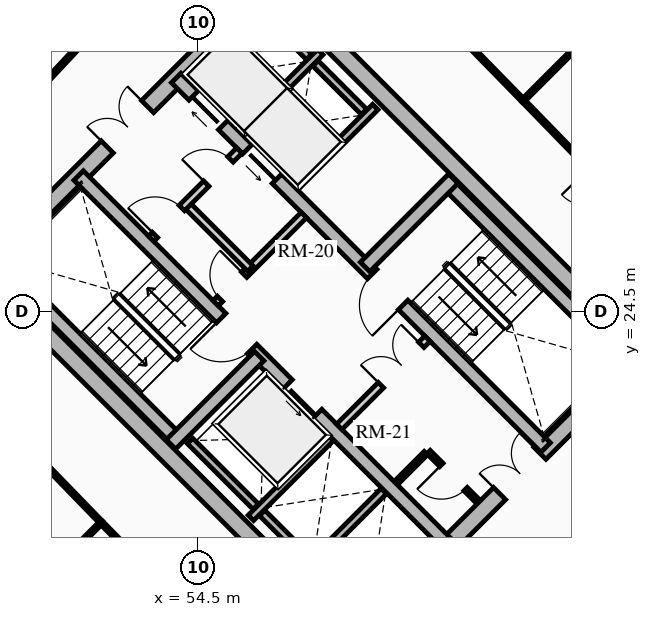
"""IFC4 building model, lengths in metres.
Left out: names, types, materials, properties, quantities, classifications, styles, units other than length and angle.
Written with IfcOpenShell. Run it as: python <this file> out.ifc"""

import sys

from ifc_helpers import new_model, si_unit, direction, frame, frame_2d, origin, place, context, subcontext, project, spatial, rectangle, extrude, source, transform, mapped, element, fill, save


model = new_model("IFC4")
c1 = context("Model", 3, precision=1e-05, world=origin(), true_north=direction((0.0, 1.0)))
c2 = subcontext(c1, "Body", "Model", "MODEL_VIEW")
j1 = project(units=[si_unit("LENGTHUNIT", "METRE"), si_unit("PLANEANGLEUNIT", "RADIAN")], contexts=[c1])
p1 = place(None, origin())
s1 = spatial("IfcSite", under=j1, at=p1, CompositionType="ELEMENT")
p2 = place(p1, origin())
s2 = spatial("IfcBuilding", under=s1, at=p2, CompositionType="ELEMENT")
p3 = place(p2, frame((0.0, 0.0, 99.25)))
s3 = spatial("IfcBuildingStorey", under=s2, at=p3, CompositionType="ELEMENT", Elevation=99.25)
for number, where, z_axis, x_axis in (
    (1, (58.737, 15.697, 0.0), (0.0, 0.0, 1.0), (-0.707, 0.707, 0.0)),
    (2, (66.303, 23.263, 0.0), (0.0, 0.0, 1.0), (-0.707, 0.707, 0.0)),
):
    element("IfcWall", number, at=place(p3, frame(where, z_axis=z_axis, x_axis=x_axis)), inside=s3, PredefinedType="SHEAR", context=c2, shape_type="SweptSolid", body=[
        extrude(rectangle(XDim=14.2, YDim=0.45, at=frame_2d((7.1, 0.0))), origin(), (0.0, 0.0, 1.0), 2.91),
    ])
p4 = place(p3, frame((58.578, 15.856, 0.0), z_axis=(0.0, 0.0, 1.0), x_axis=(0.707106781187, 0.707106781187, 0.0)))
e3 = element("IfcWall", 3, at=p4, inside=s3, PredefinedType="SHEAR", context=c2, shape_type="SweptSolid", body=[
    extrude(rectangle(XDim=10.7, YDim=0.45, at=frame_2d((5.35, 0.0))), origin(), (0.0, 0.0, 1.0), 2.91),
])
m1 = source(origin(), c2, "Body", "SweptSolid", [
    extrude(rectangle(XDim=1.5, YDim=2.02, at=frame_2d((0.75, 1.01))), frame((0.0, 0.235, 0.0), z_axis=(0.0, -1.0, 0.0), x_axis=(1.0, 0.0, 0.0)), (0.0, 0.0, 1.0), 0.47),
])
p5 = place(p4, frame((5.45, 0.0, 0.0)))
e4 = element("IfcOpeningElement", 4, at=p5, cuts=e3, PredefinedType="OPENING", context=c2, shape_type="MappedRepresentation", body=[
    mapped(m1, transform((0.0, 0.0, 0.0), x_axis=(1.0, 0.0, 0.0), y_axis=(0.0, 1.0, 0.0), z_axis=(0.0, 0.0, 1.0), scale=1.0)),
])
p6 = place(p3, frame((48.856, 25.578, 0.0), z_axis=(0.0, 0.0, 1.0), x_axis=(0.707106781187, 0.707106781187, 0.0)))
e5 = element("IfcWall", 5, at=p6, inside=s3, PredefinedType="SHEAR", context=c2, shape_type="SweptSolid", body=[
    extrude(rectangle(XDim=10.7, YDim=0.45, at=frame_2d((5.35, 0.0))), origin(), (0.0, 0.0, 1.0), 2.91),
])
p7 = place(p6, frame((4.6, 0.0, 0.0)))
e6 = element("IfcOpeningElement", 6, at=p7, cuts=e5, PredefinedType="OPENING", context=c2, shape_type="MappedRepresentation", body=[
    mapped(m1, transform((0.0, 0.0, 0.0), x_axis=(1.0, 0.0, 0.0), y_axis=(0.0, 1.0, 0.0), z_axis=(0.0, 0.0, 1.0), scale=1.0)),
])
p8 = place(p3, frame((61.078, 18.355, 0.0), z_axis=(0.0, 0.0, 1.0), x_axis=(-0.707106781187, 0.707106781187, 0.0)))
e7 = element("IfcWall", 7, at=p8, inside=s3, PredefinedType="SHEAR", context=c2, shape_type="SweptSolid", body=[
    extrude(rectangle(XDim=13.75, YDim=0.35, at=frame_2d((6.875, 0.0))), origin(), (0.0, 0.0, 1.0), 2.91),
])
m2 = source(origin(), c2, "Body", "SweptSolid", [
    extrude(rectangle(XDim=1.1, YDim=2.015, at=frame_2d((0.55, 1.007))), frame((0.0, 0.185, 0.0), z_axis=(0.0, -1.0, 0.0), x_axis=(1.0, 0.0, 0.0)), (0.0, 0.0, 1.0), 0.37),
])
p9 = place(p8, frame((4.875, 0.0, 0.0)))
e8 = element("IfcOpeningElement", 8, at=p9, cuts=e7, PredefinedType="OPENING", context=c2, shape_type="MappedRepresentation", body=[
    mapped(m2, transform((0.0, 0.0, 0.0), x_axis=(1.0, 0.0, 0.0), y_axis=(0.0, 1.0, 0.0), z_axis=(0.0, 0.0, 1.0), scale=1.0)),
])
m3 = source(origin(), c2, "Body", "SweptSolid", [
    extrude(rectangle(XDim=1.15, YDim=2.02, at=frame_2d((0.575, 1.01))), frame((0.0, 0.185, 0.0), z_axis=(0.0, -1.0, 0.0), x_axis=(1.0, 0.0, 0.0)), (0.0, 0.0, 1.0), 0.37),
])
p10 = place(p8, frame((7.295, 0.0, 0.0)))
e9 = element("IfcOpeningElement", 9, at=p10, cuts=e7, PredefinedType="OPENING", context=c2, shape_type="MappedRepresentation", body=[
    mapped(m3, transform((0.0, 0.0, 0.0), x_axis=(1.0, 0.0, 0.0), y_axis=(0.0, 1.0, 0.0), z_axis=(0.0, 0.0, 1.0), scale=1.0)),
])
p11 = place(p3, frame((63.645, 20.922, 0.0), z_axis=(0.0, 0.0, 1.0), x_axis=(-0.707106781187, 0.707106781187, 0.0)))
e10 = element("IfcWall", 10, at=p11, inside=s3, PredefinedType="SHEAR", context=c2, shape_type="SweptSolid", body=[
    extrude(rectangle(XDim=13.75, YDim=0.35, at=frame_2d((6.875, 0.0))), origin(), (0.0, 0.0, 1.0), 2.91),
])
p12 = place(p11, frame((10.0, 0.0, 0.0)))
e11 = element("IfcOpeningElement", 11, at=p12, cuts=e10, PredefinedType="OPENING", context=c2, shape_type="MappedRepresentation", body=[
    mapped(m2, transform((0.0, 0.0, 0.0), x_axis=(1.0, 0.0, 0.0), y_axis=(0.0, 1.0, 0.0), z_axis=(0.0, 0.0, 1.0), scale=1.0)),
])
p13 = place(p11, frame((12.0, 0.0, 0.0)))
e12 = element("IfcOpeningElement", 12, at=p13, cuts=e10, PredefinedType="OPENING", context=c2, shape_type="MappedRepresentation", body=[
    mapped(m2, transform((0.0, 0.0, 0.0), x_axis=(1.0, 0.0, 0.0), y_axis=(0.0, 1.0, 0.0), z_axis=(0.0, 0.0, 1.0), scale=1.0)),
])
p14 = place(p11, frame((5.305, 0.0, 0.0)))
e13 = element("IfcOpeningElement", 13, at=p14, cuts=e10, PredefinedType="OPENING", context=c2, shape_type="MappedRepresentation", body=[
    mapped(m3, transform((0.0, 0.0, 0.0), x_axis=(1.0, 0.0, 0.0), y_axis=(0.0, 1.0, 0.0), z_axis=(0.0, 0.0, 1.0), scale=1.0)),
])
p15 = place(p3, frame((53.922, 21.141, 0.0), z_axis=(0.0, 0.0, 1.0), x_axis=(-0.707088616009, 0.707124945897, 0.0)))
e14 = element("IfcWall", 14, at=p15, inside=s3, PredefinedType="SHEAR", context=c2, shape_type="SweptSolid", body=[
    extrude(rectangle(XDim=6.72, YDim=0.35, at=frame_2d((3.36, 0.0))), origin(), (0.0, 0.0, 1.0), 2.91),
])
p16 = place(p3, frame((53.784, 21.003, 0.0), z_axis=(0.0, 0.0, 1.0), x_axis=(0.707106781187, 0.707106781187, 0.0)))
e15 = element("IfcWall", 15, at=p16, inside=s3, PredefinedType="SHEAR", context=c2, shape_type="SweptSolid", body=[
    extrude(rectangle(XDim=3.285, YDim=0.35, at=frame_2d((1.643, 0.0))), origin(), (0.0, 0.0, 1.0), 2.91),
])
p17 = place(p3, frame((65.83, 23.107, 0.0), z_axis=(0.0, 0.0, 1.0), x_axis=(-0.707088616009, 0.707124945897, 0.0)))
e16 = element("IfcWall", 16, at=p17, inside=s3, PredefinedType="SHEAR", context=c2, shape_type="SweptSolid", body=[
    extrude(rectangle(XDim=6.72, YDim=0.35, at=frame_2d((3.36, 0.0))), origin(), (0.0, 0.0, 1.0), 2.91),
])
p18 = place(p3, frame((58.893, 25.674, 0.0), z_axis=(0.0, 0.0, 1.0), x_axis=(0.707106781187, 0.707106781187, 0.0)))
e17 = element("IfcWall", 17, at=p18, inside=s3, PredefinedType="SHEAR", context=c2, shape_type="SweptSolid", body=[
    extrude(rectangle(XDim=3.285, YDim=0.35, at=frame_2d((1.643, 0.0))), origin(), (0.0, 0.0, 1.0), 2.91),
])
p19 = place(p3, frame((55.888, 19.069, 0.0), z_axis=(0.0, 0.0, 1.0), x_axis=(0.707106781187, 0.707106781187, 0.0)))
e18 = element("IfcWall", 18, at=p19, inside=s3, PredefinedType="SHEAR", context=c2, shape_type="SweptSolid", body=[
    extrude(rectangle(XDim=2.97, YDim=0.2, at=frame_2d((1.485, 0.0))), origin(), (0.0, 0.0, 1.0), 2.91),
])
p20 = place(p3, frame((56.015, 19.366, 0.0), z_axis=(0.0, 0.0, 1.0), x_axis=(-0.707106781187, 0.707106781187, 0.0)))
e19 = element("IfcWall", 19, at=p20, inside=s3, PredefinedType="SHEAR", context=c2, shape_type="SweptSolid", body=[
    extrude(rectangle(XDim=2.44, YDim=0.2, at=frame_2d((1.22, 0.0))), origin(), (0.0, 0.0, 1.0), 2.91),
])
p21 = place(p3, frame((57.284, 17.673, 0.0), z_axis=(0.0, 0.0, 1.0), x_axis=(0.707147878904, 0.70706568108, 0.0)))
e20 = element("IfcWall", 20, at=p21, inside=s3, PredefinedType="SHEAR", context=c2, shape_type="SweptSolid", body=[
    extrude(rectangle(XDim=2.97, YDim=0.2, at=frame_2d((1.485, 0.0))), origin(), (0.0, 0.0, 1.0), 2.91),
])
p22 = place(p3, frame((57.412, 17.97, 0.0), z_axis=(0.0, 0.0, 1.0), x_axis=(-0.707106781187, 0.707106781187, 0.0)))
e21 = element("IfcWall", 21, at=p22, inside=s3, PredefinedType="SHEAR", context=c2, shape_type="SweptSolid", body=[
    extrude(rectangle(XDim=1.735, YDim=0.2, at=frame_2d((0.867, 0.0))), origin(), (0.0, 0.0, 1.0), 2.91),
])
p23 = place(p3, frame((57.062, 27.781, 0.0), z_axis=(0.0, 0.0, 1.0), x_axis=(0.707106781187, 0.707106781187, 0.0)))
e22 = element("IfcWall", 22, at=p23, inside=s3, PredefinedType="SHEAR", context=c2, shape_type="SweptSolid", body=[
    extrude(rectangle(XDim=2.97, YDim=0.2, at=frame_2d((1.485, 0.0))), origin(), (0.0, 0.0, 1.0), 2.91),
])
p24 = place(p3, frame((55.615, 29.227, 0.0), z_axis=(0.0, 0.0, 1.0), x_axis=(0.707147878904, 0.70706568108, 0.0)))
e23 = element("IfcWall", 23, at=p24, inside=s3, PredefinedType="SHEAR", context=c2, shape_type="SweptSolid", body=[
    extrude(rectangle(XDim=2.97, YDim=0.2, at=frame_2d((1.485, 0.0))), origin(), (0.0, 0.0, 1.0), 2.91),
])
p25 = place(p3, frame((58.865, 29.754, 0.0), z_axis=(0.0, 0.0, 1.0), x_axis=(-0.707174411312, 0.707039144592, 0.0)))
e24 = element("IfcWall", 24, at=p25, inside=s3, PredefinedType="SHEAR", context=c2, shape_type="SweptSolid", body=[
    extrude(rectangle(XDim=1.805, YDim=0.2, at=frame_2d((0.902, 0.0))), origin(), (0.0, 0.0, 1.0), 2.91),
])
p26 = place(p3, frame((57.419, 31.2, 0.0), z_axis=(0.0, 0.0, 1.0), x_axis=(-0.707032117043, 0.707181437447, 0.0)))
e25 = element("IfcWall", 25, at=p26, inside=s3, PredefinedType="SHEAR", context=c2, shape_type="SweptSolid", body=[
    extrude(rectangle(XDim=1.635, YDim=0.2, at=frame_2d((0.817, 0.0))), origin(), (0.0, 0.0, 1.0), 2.91),
])
p27 = place(p3, frame((58.214, 21.467, 0.0), z_axis=(0.0, 0.0, 1.0), x_axis=(0.707106781187, 0.707106781187, 0.0)))
e26 = element("IfcWall", 26, at=p27, inside=s3, PredefinedType="PARTITIONING", context=c2, shape_type="SweptSolid", body=[
    extrude(rectangle(XDim=3.28, YDim=0.2, at=frame_2d((1.64, 0.0))), origin(), (0.0, 0.0, 1.0), 2.655),
])
m4 = source(origin(), c2, "Body", "SweptSolid", [
    extrude(rectangle(XDim=1.5, YDim=2.02, at=frame_2d((0.75, 1.01))), frame((0.0, 0.11, 0.0), z_axis=(0.0, -1.0, 0.0), x_axis=(1.0, 0.0, 0.0)), (0.0, 0.0, 1.0), 0.22),
])
p28 = place(p27, frame((1.55, 0.0, 0.0)))
e27 = element("IfcOpeningElement", 27, at=p28, cuts=e26, PredefinedType="OPENING", context=c2, shape_type="MappedRepresentation", body=[
    mapped(m4, transform((0.0, 0.0, 0.0), x_axis=(1.0, 0.0, 0.0), y_axis=(0.0, 1.0, 0.0), z_axis=(0.0, 0.0, 1.0), scale=1.0)),
])
p29 = place(p3, frame((54.961, 24.719, 0.0), z_axis=(0.0, 0.0, 1.0), x_axis=(0.707106781187, 0.707106781187, 0.0)))
e28 = element("IfcWall", 28, at=p29, inside=s3, PredefinedType="PARTITIONING", context=c2, shape_type="SweptSolid", body=[
    extrude(rectangle(XDim=3.28, YDim=0.2, at=frame_2d((1.64, 0.0))), origin(), (0.0, 0.0, 1.0), 2.655),
])
m5 = source(origin(), c2, "Body", "SweptSolid", [
    extrude(rectangle(XDim=0.9, YDim=2.005, at=frame_2d((0.45, 1.002))), frame((0.0, 0.11, 0.0), z_axis=(0.0, -1.0, 0.0), x_axis=(1.0, 0.0, 0.0)), (0.0, 0.0, 1.0), 0.22),
])
p30 = place(p29, frame((0.16, 0.0, 0.0)))
e29 = element("IfcOpeningElement", 29, at=p30, cuts=e28, PredefinedType="OPENING", context=c2, shape_type="MappedRepresentation", body=[
    mapped(m5, transform((0.0, 0.0, 0.0), x_axis=(1.0, 0.0, 0.0), y_axis=(0.0, 1.0, 0.0), z_axis=(0.0, 0.0, 1.0), scale=1.0)),
])
p31 = place(p3, frame((55.874, 25.631, 0.0), z_axis=(0.0, 0.0, 1.0), x_axis=(-0.707157639372, 0.707055919343, 0.0)))
e30 = element("IfcWall", 30, at=p31, inside=s3, PredefinedType="PARTITIONING", context=c2, shape_type="SweptSolid", body=[
    extrude(rectangle(XDim=2.4, YDim=0.2, at=frame_2d((1.2, 0.0))), origin(), (0.0, 0.0, 1.0), 2.655),
])
p32 = place(p3, frame((53.264, 26.416, 0.0), z_axis=(0.0, 0.0, 1.0), x_axis=(0.707106781187, 0.707106781187, 0.0)))
e31 = element("IfcWall", 31, at=p32, inside=s3, PredefinedType="PARTITIONING", context=c2, shape_type="SweptSolid", body=[
    extrude(rectangle(XDim=3.28, YDim=0.2, at=frame_2d((1.64, 0.0))), origin(), (0.0, 0.0, 1.0), 2.655),
])
m6 = source(origin(), c2, "Body", "SweptSolid", [
    extrude(rectangle(XDim=1.0, YDim=2.015, at=frame_2d((0.5, 1.007))), frame((0.0, 0.11, 0.0), z_axis=(0.0, -1.0, 0.0), x_axis=(1.0, 0.0, 0.0)), (0.0, 0.0, 1.0), 0.22),
])
p33 = place(p32, frame((0.14, 0.0, 0.0)))
e32 = element("IfcOpeningElement", 32, at=p33, cuts=e31, PredefinedType="OPENING", context=c2, shape_type="MappedRepresentation", body=[
    mapped(m6, transform((0.0, 0.0, 0.0), x_axis=(1.0, 0.0, 0.0), y_axis=(0.0, 1.0, 0.0), z_axis=(0.0, 0.0, 1.0), scale=1.0)),
])
p34 = place(p32, frame((2.05, 0.0, 0.0)))
e33 = element("IfcOpeningElement", 33, at=p34, cuts=e31, PredefinedType="OPENING", context=c2, shape_type="MappedRepresentation", body=[
    mapped(m5, transform((0.0, 0.0, 0.0), x_axis=(1.0, 0.0, 0.0), y_axis=(0.0, 1.0, 0.0), z_axis=(0.0, 0.0, 1.0), scale=1.0)),
])
p35 = place(p3, frame((61.835, 19.529, 0.0), z_axis=(0.0, 0.0, 1.0), x_axis=(-0.707174592913, 0.707038962956, 0.0)))
e34 = element("IfcWall", 34, at=p35, inside=s3, PredefinedType="PARTITIONING", context=c2, shape_type="SweptSolid", body=[
    extrude(rectangle(XDim=1.8, YDim=0.125, at=frame_2d((0.9, 0.0))), origin(), (0.0, 0.0, 1.0), 2.655),
])
m7 = source(origin(), c2, "Body", "SweptSolid", [
    extrude(rectangle(XDim=0.9, YDim=2.005, at=frame_2d((0.45, 1.002))), frame((0.0, 0.073, 0.0), z_axis=(0.0, -1.0, 0.0), x_axis=(1.0, 0.0, 0.0)), (0.0, 0.0, 1.0), 0.145),
])
p36 = place(p35, frame((0.42, 0.0, 0.0)))
e35 = element("IfcOpeningElement", 35, at=p36, cuts=e34, PredefinedType="OPENING", context=c2, shape_type="MappedRepresentation", body=[
    mapped(m7, transform((0.0, 0.0, 0.0), x_axis=(1.0, 0.0, 0.0), y_axis=(0.0, 1.0, 0.0), z_axis=(0.0, 0.0, 1.0), scale=1.0)),
])
p37 = place(p3, frame((59.713, 19.996, 0.0), z_axis=(0.0, 0.0, 1.0), x_axis=(0.707217726, 0.706995818963, 0.0)))
e36 = element("IfcWall", 36, at=p37, inside=s3, PredefinedType="PARTITIONING", context=c2, shape_type="SweptSolid", body=[
    extrude(rectangle(XDim=1.1, YDim=0.125, at=frame_2d((0.55, 0.0))), origin(), (0.0, 0.0, 1.0), 2.655),
])
p38 = place(p3, frame((63.051, 30.051, 0.0), z_axis=(0.0, 0.0, 1.0), x_axis=(-0.698911483116, 0.715208178622, 0.0)))
e37 = element("IfcWall", 37, at=p38, inside=s3, PredefinedType="MOVABLE", context=c2, shape_type="SweptSolid", body=[
    extrude(rectangle(XDim=6.082, YDim=0.1, at=frame_2d((3.041, 0.0))), origin(), (0.0, 0.0, 1.0), 2.225),
])
p39 = place(p3, frame((52.072, 32.237, 0.0), z_axis=(0.0, 0.0, 1.0), x_axis=(-0.682528774423, -0.730858722383, 0.0)))
e38 = element("IfcWall", 38, at=p39, inside=s3, PredefinedType="MOVABLE", context=c2, shape_type="SweptSolid", body=[
    extrude(rectangle(XDim=6.486, YDim=0.1, at=frame_2d((3.243, 0.0))), origin(), (0.0, 0.0, 1.0), 2.225),
])
p40 = place(p3, frame((47.763, 23.265, 0.0), z_axis=(0.0, 0.0, 1.0), x_axis=(0.696243493404, -0.717805682544, 0.0)))
e39 = element("IfcWall", 39, at=p40, inside=s3, PredefinedType="MOVABLE", context=c2, shape_type="SweptSolid", body=[
    extrude(rectangle(XDim=6.012, YDim=0.1, at=frame_2d((3.006, 0.0))), origin(), (0.0, 0.0, 1.0), 2.655),
])
m8 = source(origin(), c2, "Body", "SweptSolid", [
    extrude(rectangle(XDim=1.05, YDim=2.015, at=frame_2d((0.525, 1.007))), frame((0.0, 0.06, 0.0), z_axis=(0.0, -1.0, 0.0), x_axis=(1.0, 0.0, 0.0)), (0.0, 0.0, 1.0), 0.12),
])
p41 = place(p40, frame((2.481, 0.0, 0.0)))
e40 = element("IfcOpeningElement", 40, at=p41, cuts=e39, PredefinedType="OPENING", context=c2, shape_type="MappedRepresentation", body=[
    mapped(m8, transform((0.0, 0.0, 0.0), x_axis=(1.0, 0.0, 0.0), y_axis=(0.0, 1.0, 0.0), z_axis=(0.0, 0.0, 1.0), scale=1.0)),
])
p42 = place(p3, frame((51.949, 18.949, 0.0), z_axis=(0.0, 0.0, 1.0), x_axis=(0.699840807936, -0.714298847506, 0.0)))
e41 = element("IfcWall", 41, at=p42, inside=s3, PredefinedType="MOVABLE", context=c2, shape_type="SweptSolid", body=[
    extrude(rectangle(XDim=6.13, YDim=0.1, at=frame_2d((3.065, 0.0))), origin(), (0.0, 0.0, 1.0), 2.225),
])
p43 = place(p3, frame((62.875, 16.709, 0.0), z_axis=(0.0, 0.0, 1.0), x_axis=(0.682290572861, 0.731081099595, 0.0)))
e42 = element("IfcWall", 42, at=p43, inside=s3, PredefinedType="MOVABLE", context=c2, shape_type="SweptSolid", body=[
    extrude(rectangle(XDim=6.6, YDim=0.1, at=frame_2d((3.3, 0.0))), origin(), (0.0, 0.0, 1.0), 2.225),
])
p44 = place(p3, frame((67.213, 25.768, 0.0), z_axis=(0.0, 0.0, 1.0), x_axis=(-0.696916079748, 0.717152687918, 0.0)))
e43 = element("IfcWall", 43, at=p44, inside=s3, PredefinedType="MOVABLE", context=c2, shape_type="SweptSolid", body=[
    extrude(rectangle(XDim=5.972, YDim=0.1, at=frame_2d((2.986, 0.0))), origin(), (0.0, 0.0, 1.0), 2.655),
])
m9 = source(origin(), c2, "Body", "SweptSolid", [
    extrude(rectangle(XDim=1.0, YDim=2.015, at=frame_2d((0.5, 1.007))), frame((0.0, 0.06, 0.0), z_axis=(0.0, -1.0, 0.0), x_axis=(1.0, 0.0, 0.0)), (0.0, 0.0, 1.0), 0.12),
])
p45 = place(p44, frame((2.486, 0.0, 0.0)))
e44 = element("IfcOpeningElement", 44, at=p45, cuts=e43, PredefinedType="OPENING", context=c2, shape_type="MappedRepresentation", body=[
    mapped(m9, transform((0.0, 0.0, 0.0), x_axis=(1.0, 0.0, 0.0), y_axis=(0.0, 1.0, 0.0), z_axis=(0.0, 0.0, 1.0), scale=1.0)),
])
for number, where, z_axis, x_axis in (
    (45, (63.051, 30.051, 0.0), (0.0, 0.0, 1.0), (0.707, 0.707, 0.0)),
    (46, (51.949, 18.949, 0.0), (0.0, 0.0, 1.0), (-0.707, -0.707, 0.0)),
):
    element("IfcWall", number, at=place(p3, frame(where, z_axis=z_axis, x_axis=x_axis)), inside=s3, PredefinedType="MOVABLE", context=c2, shape_type="SweptSolid", body=[
        extrude(rectangle(XDim=7.711, YDim=0.1, at=frame_2d((3.855, 0.0))), origin(), (0.0, 0.0, 1.0), 2.179),
    ])
m10 = source(origin(), c2, "Body", "SweptSolid", [
    extrude(rectangle(XDim=1.1, YDim=2.015, at=frame_2d((0.55, 1.007))), frame((0.0, 0.025, 0.0), z_axis=(0.0, -1.0, 0.0), x_axis=(1.0, 0.0, 0.0)), (0.0, 0.0, 1.0), 0.05),
])
p46 = place(p9, origin())
e47 = element("IfcDoor", 47, at=p46, inside=s3, OperationType="SLIDING_TO_LEFT", PredefinedType="DOOR", context=c2, shape_type="MappedRepresentation", body=[
    mapped(m10, transform((0.0, 0.0, 0.0), x_axis=(1.0, 0.0, 0.0), y_axis=(0.0, 1.0, 0.0), z_axis=(0.0, 0.0, 1.0), scale=1.0)),
])
fill(e8, e47)
p47 = place(p12, origin())
e48 = element("IfcDoor", 48, at=p47, inside=s3, OperationType="SLIDING_TO_LEFT", PredefinedType="DOOR", context=c2, shape_type="MappedRepresentation", body=[
    mapped(m10, transform((0.0, 0.0, 0.0), x_axis=(1.0, 0.0, 0.0), y_axis=(0.0, 1.0, 0.0), z_axis=(0.0, 0.0, 1.0), scale=1.0)),
])
fill(e11, e48)
p48 = place(p13, origin())
e49 = element("IfcDoor", 49, at=p48, inside=s3, OperationType="SLIDING_TO_RIGHT", PredefinedType="DOOR", context=c2, shape_type="MappedRepresentation", body=[
    mapped(m10, transform((0.0, 0.0, 0.0), x_axis=(1.0, 0.0, 0.0), y_axis=(0.0, 1.0, 0.0), z_axis=(0.0, 0.0, 1.0), scale=1.0)),
])
fill(e12, e49)
m11 = source(origin(), c2, "Body", "SweptSolid", [
    extrude(rectangle(XDim=1.15, YDim=2.02, at=frame_2d((0.575, 1.01))), frame((0.0, 0.025, 0.0), z_axis=(0.0, -1.0, 0.0), x_axis=(1.0, 0.0, 0.0)), (0.0, 0.0, 1.0), 0.05),
])
p49 = place(p10, origin())
e50 = element("IfcDoor", 50, at=p49, inside=s3, OperationType="SINGLE_SWING_RIGHT", PredefinedType="DOOR", context=c2, shape_type="MappedRepresentation", body=[
    mapped(m11, transform((0.0, 0.0, 0.0), x_axis=(1.0, 0.0, 0.0), y_axis=(0.0, 1.0, 0.0), z_axis=(0.0, 0.0, 1.0), scale=1.0)),
])
fill(e9, e50)
p50 = place(p14, origin())
e51 = element("IfcDoor", 51, at=p50, inside=s3, OperationType="SINGLE_SWING_LEFT", PredefinedType="DOOR", context=c2, shape_type="MappedRepresentation", body=[
    mapped(m11, transform((0.0, 0.0, 0.0), x_axis=(1.0, 0.0, 0.0), y_axis=(0.0, 1.0, 0.0), z_axis=(0.0, 0.0, 1.0), scale=1.0)),
])
fill(e13, e51)
m12 = source(origin(), c2, "Body", "SweptSolid", [
    extrude(rectangle(XDim=1.5, YDim=2.02, at=frame_2d((0.75, 1.01))), frame((0.0, 0.025, 0.0), z_axis=(0.0, -1.0, 0.0), x_axis=(1.0, 0.0, 0.0)), (0.0, 0.0, 1.0), 0.05),
])
p51 = place(p7, origin())
e52 = element("IfcDoor", 52, at=p51, inside=s3, OperationType="DOUBLE_DOOR_SINGLE_SWING", PredefinedType="DOOR", context=c2, shape_type="MappedRepresentation", body=[
    mapped(m12, transform((0.0, 0.0, 0.0), x_axis=(1.0, 0.0, 0.0), y_axis=(0.0, 1.0, 0.0), z_axis=(0.0, 0.0, 1.0), scale=1.0)),
])
fill(e6, e52)
p52 = place(p5, origin())
e53 = element("IfcDoor", 53, at=p52, inside=s3, OperationType="DOUBLE_DOOR_SINGLE_SWING", PredefinedType="DOOR", context=c2, shape_type="MappedRepresentation", body=[
    mapped(m12, transform((0.0, 0.0, 0.0), x_axis=(1.0, 0.0, 0.0), y_axis=(0.0, 1.0, 0.0), z_axis=(0.0, 0.0, 1.0), scale=1.0)),
])
fill(e4, e53)
p53 = place(p28, origin())
e54 = element("IfcDoor", 54, at=p53, inside=s3, OperationType="DOUBLE_DOOR_SINGLE_SWING", PredefinedType="DOOR", context=c2, shape_type="MappedRepresentation", body=[
    mapped(m12, transform((0.0, 0.0, 0.0), x_axis=(1.0, 0.0, 0.0), y_axis=(0.0, 1.0, 0.0), z_axis=(0.0, 0.0, 1.0), scale=1.0)),
])
fill(e27, e54)
m13 = source(origin(), c2, "Body", "SweptSolid", [
    extrude(rectangle(XDim=0.9, YDim=2.005, at=frame_2d((0.45, 1.002))), frame((0.0, 0.025, 0.0), z_axis=(0.0, -1.0, 0.0), x_axis=(1.0, 0.0, 0.0)), (0.0, 0.0, 1.0), 0.05),
])
p54 = place(p30, origin())
e55 = element("IfcDoor", 55, at=p54, inside=s3, OperationType="SINGLE_SWING_RIGHT", PredefinedType="DOOR", context=c2, shape_type="MappedRepresentation", body=[
    mapped(m13, transform((0.0, 0.0, 0.0), x_axis=(1.0, 0.0, 0.0), y_axis=(0.0, 1.0, 0.0), z_axis=(0.0, 0.0, 1.0), scale=1.0)),
])
fill(e29, e55)
m14 = source(origin(), c2, "Body", "SweptSolid", [
    extrude(rectangle(XDim=1.0, YDim=2.015, at=frame_2d((0.5, 1.007))), frame((0.0, 0.025, 0.0), z_axis=(0.0, -1.0, 0.0), x_axis=(1.0, 0.0, 0.0)), (0.0, 0.0, 1.0), 0.05),
])
p55 = place(p33, origin())
e56 = element("IfcDoor", 56, at=p55, inside=s3, OperationType="SINGLE_SWING_LEFT", PredefinedType="DOOR", context=c2, shape_type="MappedRepresentation", body=[
    mapped(m14, transform((0.0, 0.0, 0.0), x_axis=(1.0, 0.0, 0.0), y_axis=(0.0, 1.0, 0.0), z_axis=(0.0, 0.0, 1.0), scale=1.0)),
])
fill(e32, e56)
p56 = place(p36, origin())
e57 = element("IfcDoor", 57, at=p56, inside=s3, OperationType="SINGLE_SWING_RIGHT", PredefinedType="DOOR", context=c2, shape_type="MappedRepresentation", body=[
    mapped(m13, transform((0.0, 0.0, 0.0), x_axis=(1.0, 0.0, 0.0), y_axis=(0.0, 1.0, 0.0), z_axis=(0.0, 0.0, 1.0), scale=1.0)),
])
fill(e35, e57)
p57 = place(p34, origin())
e58 = element("IfcDoor", 58, at=p57, inside=s3, OperationType="SINGLE_SWING_LEFT", PredefinedType="DOOR", context=c2, shape_type="MappedRepresentation", body=[
    mapped(m13, transform((0.0, 0.0, 0.0), x_axis=(1.0, 0.0, 0.0), y_axis=(0.0, 1.0, 0.0), z_axis=(0.0, 0.0, 1.0), scale=1.0)),
])
fill(e33, e58)
save(model, sys.argv[1])
